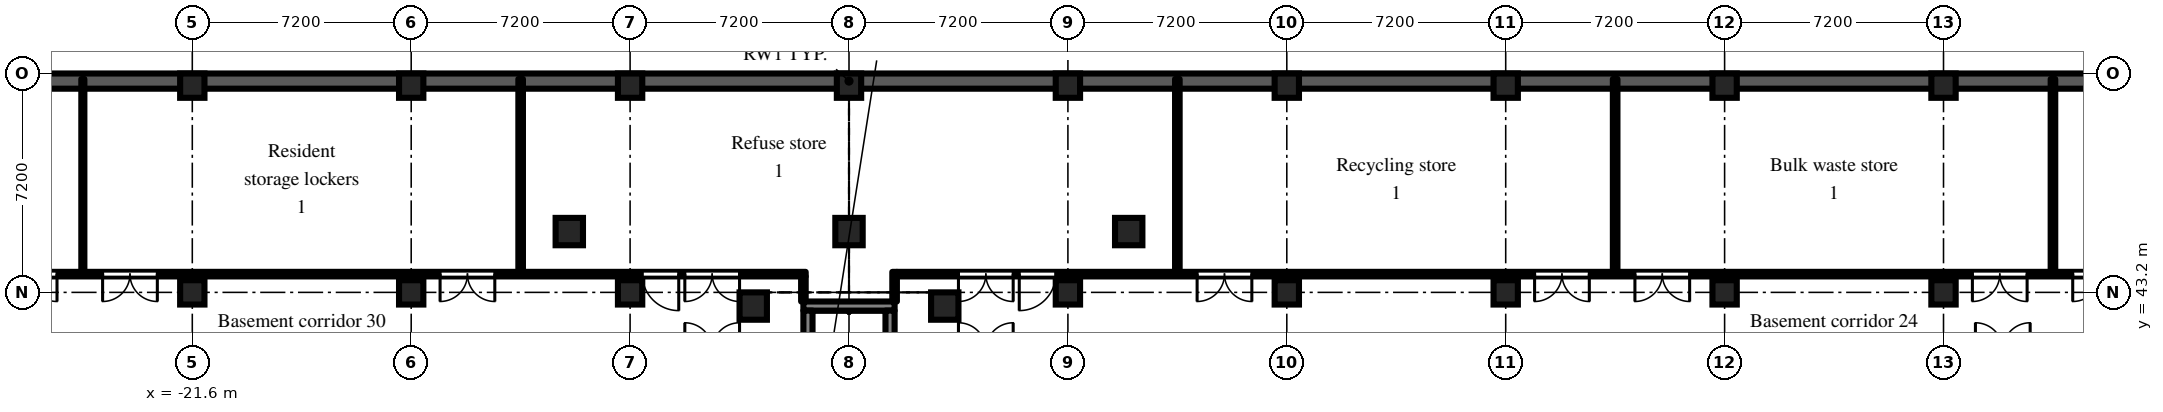
"""IFC4 building model, lengths in metres.
Left out: names, types, materials, properties, quantities, classifications, styles, units other than length and angle.
Written with IfcOpenShell. Run it as: python <this file> out.ifc"""

import sys

from ifc_helpers import new_model, si_unit, direction, frame, frame_2d, origin, origin_2d, place, context, subcontext, project, spatial, rectangle, extrude, element, fill, save


model = new_model("IFC4")
c1 = context("Model", 3, precision=1e-05, world=origin(), true_north=direction((0.0, 1.0)))
c2 = subcontext(c1, "Body", "Model", "MODEL_VIEW")
j1 = project(units=[si_unit("LENGTHUNIT", "METRE"), si_unit("PLANEANGLEUNIT", "RADIAN")], contexts=[c1])
p1 = place(None, origin())
s1 = spatial("IfcSite", under=j1, at=p1, CompositionType="ELEMENT")
p2 = place(p1, origin())
s2 = spatial("IfcBuilding", under=s1, at=p2, CompositionType="ELEMENT")
p3 = place(p2, frame((0.0, 0.0, -4.8)))
s3 = spatial("IfcBuildingStorey", under=s2, at=p3, CompositionType="ELEMENT", Elevation=-4.8)
p4 = place(p3, frame((-50.4, 50.15, -0.5), z_axis=(0.0, 0.0, 1.0), x_axis=(1.0, 0.0, 0.0)))
e1 = element("IfcWall", 1, at=p4, inside=s3, PredefinedType="SOLIDWALL", context=c2, shape_type="SweptSolid", body=[
    extrude(rectangle(XDim=100.8, YDim=0.5, at=frame_2d((50.4, 0.0))), origin(), (0.0, 0.0, 1.0), 5.3),
])
for number, where, z_axis, x_axis in (
    (2, (-3.15, 42.75, -0.5), (0.0, 0.0, 1.0), (1.0, 0.0, 0.0)),
    (3, (3.15, 42.75, -0.5), (0.0, 0.0, 1.0), (1.0, 0.0, 0.0)),
):
    element("IfcColumn", number, at=place(p3, frame(where, z_axis=z_axis, x_axis=x_axis)), inside=s3, PredefinedType="COLUMN", context=c2, shape_type="SweptSolid", body=[
        extrude(rectangle(XDim=0.9, YDim=0.9, at=origin_2d()), origin(), (0.0, 0.0, 1.0), 5.3),
    ])
for number, where, z_axis, x_axis in (
    (4, (-21.6, 43.2, -0.5), (0.0, 0.0, 1.0), (1.0, 0.0, 0.0)),
    (5, (-21.6, 50.0, -0.5), (0.0, 0.0, 1.0), (1.0, 0.0, 0.0)),
    (6, (-14.4, 43.2, -0.5), (0.0, 0.0, 1.0), (1.0, 0.0, 0.0)),
    (7, (-14.4, 50.0, -0.5), (0.0, 0.0, 1.0), (1.0, 0.0, 0.0)),
    (8, (-7.2, 43.2, -0.5), (0.0, 0.0, 1.0), (1.0, 0.0, 0.0)),
    (9, (-7.2, 50.0, -0.5), (0.0, 0.0, 1.0), (1.0, 0.0, 0.0)),
    (10, (0.0, 50.0, -0.5), (0.0, 0.0, 1.0), (1.0, 0.0, 0.0)),
    (11, (7.2, 43.2, -0.5), (0.0, 0.0, 1.0), (1.0, 0.0, 0.0)),
    (12, (7.2, 50.0, -0.5), (0.0, 0.0, 1.0), (1.0, 0.0, 0.0)),
    (13, (14.4, 43.2, -0.5), (0.0, 0.0, 1.0), (1.0, 0.0, 0.0)),
    (14, (14.4, 50.0, -0.5), (0.0, 0.0, 1.0), (1.0, 0.0, 0.0)),
    (15, (21.6, 43.2, -0.5), (0.0, 0.0, 1.0), (1.0, 0.0, 0.0)),
    (16, (21.6, 50.0, -0.5), (0.0, 0.0, 1.0), (1.0, 0.0, 0.0)),
    (17, (28.8, 43.2, -0.5), (0.0, 0.0, 1.0), (1.0, 0.0, 0.0)),
    (18, (28.8, 50.0, -0.5), (0.0, 0.0, 1.0), (1.0, 0.0, 0.0)),
    (19, (36.0, 43.2, -0.5), (0.0, 0.0, 1.0), (1.0, 0.0, 0.0)),
    (20, (36.0, 50.0, -0.5), (0.0, 0.0, 1.0), (1.0, 0.0, 0.0)),
):
    element("IfcColumn", number, at=place(p3, frame(where, z_axis=z_axis, x_axis=x_axis)), inside=s3, PredefinedType="COLUMN", context=c2, shape_type="SweptSolid", body=[
        extrude(rectangle(XDim=0.8, YDim=0.8, at=origin_2d()), origin(), (0.0, 0.0, 1.0), 5.3),
    ])
for number, where, z_axis, x_axis in (
    (21, (-9.2, 45.2, -0.5), (0.0, 0.0, 1.0), (1.0, 0.0, 0.0)),
    (22, (0.0, 45.2, -0.5), (0.0, 0.0, 1.0), (1.0, 0.0, 0.0)),
    (23, (9.2, 45.2, -0.5), (0.0, 0.0, 1.0), (1.0, 0.0, 0.0)),
):
    element("IfcColumn", number, at=place(p3, frame(where, z_axis=z_axis, x_axis=x_axis)), inside=s3, PredefinedType="COLUMN", context=c2, shape_type="SweptSolid", body=[
        extrude(rectangle(XDim=0.9, YDim=0.9, at=origin_2d()), origin(), (0.0, 0.0, 1.0), 5.3),
    ])
p5 = place(p3, frame((-1.5, 42.75, 0.0), z_axis=(0.0, 0.0, 1.0), x_axis=(1.0, 0.0, 0.0)))
e24 = element("IfcWall", 24, at=p5, inside=s3, PredefinedType="SHEAR", context=c2, shape_type="SweptSolid", body=[
    extrude(rectangle(XDim=3.0, YDim=0.3, at=frame_2d((1.5, 0.0))), origin(), (0.0, 0.0, 1.0), 4.35),
])
for number, where, z_axis, x_axis in (
    (25, (-1.35, 36.8, 0.0), (0.0, 0.0, 1.0), (0.0, 1.0, 0.0)),
    (26, (1.35, 36.8, 0.0), (0.0, 0.0, 1.0), (0.0, 1.0, 0.0)),
):
    element("IfcWall", number, at=place(p3, frame(where, z_axis=z_axis, x_axis=x_axis)), inside=s3, PredefinedType="SHEAR", context=c2, shape_type="SweptSolid", body=[
        extrude(rectangle(XDim=5.8, YDim=0.3, at=frame_2d((2.9, 0.0))), origin(), (0.0, 0.0, 1.0), 4.35),
    ])
p6 = place(p3, frame((-43.725, 43.8, 0.0), z_axis=(0.0, 0.0, 1.0), x_axis=(1.0, 0.0, 0.0)))
e27 = element("IfcWall", 27, at=p6, inside=s3, PredefinedType="PARTITIONING", context=c2, shape_type="SweptSolid", body=[
    extrude(rectangle(XDim=42.3, YDim=0.15, at=frame_2d((21.15, 0.0))), origin(), (0.0, 0.0, 1.0), 4.35),
])
p7 = place(p6, frame((4.775, 0.0, 0.0)))
e28 = element("IfcOpeningElement", 28, at=p7, cuts=e27, PredefinedType="OPENING", context=c2, shape_type="SweptSolid", body=[
    extrude(rectangle(XDim=1.8, YDim=2.1, at=frame_2d((0.9, 1.05))), frame((0.0, 0.085, 0.0), z_axis=(0.0, -1.0, 0.0), x_axis=(1.0, 0.0, 0.0)), (0.0, 0.0, 1.0), 0.17),
])
p8 = place(p6, frame((15.875, 0.0, 0.0)))
e29 = element("IfcOpeningElement", 29, at=p8, cuts=e27, PredefinedType="OPENING", context=c2, shape_type="SweptSolid", body=[
    extrude(rectangle(XDim=1.8, YDim=2.1, at=frame_2d((0.9, 1.05))), frame((0.0, 0.085, 0.0), z_axis=(0.0, -1.0, 0.0), x_axis=(1.0, 0.0, 0.0)), (0.0, 0.0, 1.0), 0.17),
])
p9 = place(p6, frame((19.175, 0.0, 0.0)))
e30 = element("IfcOpeningElement", 30, at=p9, cuts=e27, PredefinedType="OPENING", context=c2, shape_type="SweptSolid", body=[
    extrude(rectangle(XDim=1.8, YDim=2.1, at=frame_2d((0.9, 1.05))), frame((0.0, 0.085, 0.0), z_axis=(0.0, -1.0, 0.0), x_axis=(1.0, 0.0, 0.0)), (0.0, 0.0, 1.0), 0.17),
])
p10 = place(p6, frame((30.275, 0.0, 0.0)))
e31 = element("IfcOpeningElement", 31, at=p10, cuts=e27, PredefinedType="OPENING", context=c2, shape_type="SweptSolid", body=[
    extrude(rectangle(XDim=1.8, YDim=2.1, at=frame_2d((0.9, 1.05))), frame((0.0, 0.085, 0.0), z_axis=(0.0, -1.0, 0.0), x_axis=(1.0, 0.0, 0.0)), (0.0, 0.0, 1.0), 0.17),
])
p11 = place(p6, frame((36.925, 0.0, 0.0)))
e32 = element("IfcOpeningElement", 32, at=p11, cuts=e27, PredefinedType="OPENING", context=c2, shape_type="SweptSolid", body=[
    extrude(rectangle(XDim=1.2, YDim=2.1, at=frame_2d((0.6, 1.05))), frame((0.0, 0.085, 0.0), z_axis=(0.0, -1.0, 0.0), x_axis=(1.0, 0.0, 0.0)), (0.0, 0.0, 1.0), 0.17),
])
p12 = place(p6, frame((38.325, 0.0, 0.0)))
e33 = element("IfcOpeningElement", 33, at=p12, cuts=e27, PredefinedType="OPENING", context=c2, shape_type="SweptSolid", body=[
    extrude(rectangle(XDim=1.8, YDim=2.1, at=frame_2d((0.9, 1.05))), frame((0.0, 0.085, 0.0), z_axis=(0.0, -1.0, 0.0), x_axis=(1.0, 0.0, 0.0)), (0.0, 0.0, 1.0), 0.17),
])
p13 = place(p6, frame((1.675, 0.0, 0.0)))
e34 = element("IfcOpeningElement", 34, at=p13, cuts=e27, PredefinedType="OPENING", context=c2, shape_type="SweptSolid", body=[
    extrude(rectangle(XDim=1.8, YDim=2.1, at=frame_2d((0.9, 1.05))), frame((0.0, 0.085, 0.0), z_axis=(0.0, -1.0, 0.0), x_axis=(1.0, 0.0, 0.0)), (0.0, 0.0, 1.0), 0.17),
])
p14 = place(p3, frame((-25.2, 43.875, 0.0), z_axis=(0.0, 0.0, 1.0), x_axis=(0.0, 1.0, 0.0)))
e35 = element("IfcWall", 35, at=p14, inside=s3, PredefinedType="PARTITIONING", context=c2, shape_type="SweptSolid", body=[
    extrude(rectangle(XDim=6.345, YDim=0.1, at=frame_2d((3.172, 0.0))), origin(), (0.0, 0.0, 1.0), 4.35),
])
p15 = place(p3, frame((-10.8, 43.875, 0.0), z_axis=(0.0, 0.0, 1.0), x_axis=(0.0, 1.0, 0.0)))
e36 = element("IfcWall", 36, at=p15, inside=s3, PredefinedType="PARTITIONING", context=c2, shape_type="SweptSolid", body=[
    extrude(rectangle(XDim=6.345, YDim=0.15, at=frame_2d((3.172, 0.0))), origin(), (0.0, 0.0, 1.0), 4.35),
])
p16 = place(p3, frame((-1.5, 42.9, 0.0), z_axis=(0.0, 0.0, 1.0), x_axis=(0.0, 1.0, 0.0)))
e37 = element("IfcWall", 37, at=p16, inside=s3, PredefinedType="PARTITIONING", context=c2, shape_type="SweptSolid", body=[
    extrude(rectangle(XDim=0.825, YDim=0.15, at=frame_2d((0.413, 0.0))), origin(), (0.0, 0.0, 1.0), 4.35),
])
p17 = place(p3, frame((1.5, 42.9, 0.0), z_axis=(0.0, 0.0, 1.0), x_axis=(0.0, 1.0, 0.0)))
e38 = element("IfcWall", 38, at=p17, inside=s3, PredefinedType="PARTITIONING", context=c2, shape_type="SweptSolid", body=[
    extrude(rectangle(XDim=0.975, YDim=0.15, at=frame_2d((0.488, 0.0))), origin(), (0.0, 0.0, 1.0), 4.35),
])
p18 = place(p3, frame((1.575, 43.8, 0.0), z_axis=(0.0, 0.0, 1.0), x_axis=(1.0, 0.0, 0.0)))
e39 = element("IfcWall", 39, at=p18, inside=s3, PredefinedType="PARTITIONING", context=c2, shape_type="SweptSolid", body=[
    extrude(rectangle(XDim=42.3, YDim=0.15, at=frame_2d((21.15, 0.0))), origin(), (0.0, 0.0, 1.0), 4.35),
])
p19 = place(p18, frame((2.025, 0.0, 0.0)))
e40 = element("IfcOpeningElement", 40, at=p19, cuts=e39, PredefinedType="OPENING", context=c2, shape_type="SweptSolid", body=[
    extrude(rectangle(XDim=1.8, YDim=2.1, at=frame_2d((0.9, 1.05))), frame((0.0, 0.085, 0.0), z_axis=(0.0, -1.0, 0.0), x_axis=(1.0, 0.0, 0.0)), (0.0, 0.0, 1.0), 0.17),
])
p20 = place(p18, frame((4.025, 0.0, 0.0)))
e41 = element("IfcOpeningElement", 41, at=p20, cuts=e39, PredefinedType="OPENING", context=c2, shape_type="SweptSolid", body=[
    extrude(rectangle(XDim=1.2, YDim=2.1, at=frame_2d((0.6, 1.05))), frame((0.0, 0.085, 0.0), z_axis=(0.0, -1.0, 0.0), x_axis=(1.0, 0.0, 0.0)), (0.0, 0.0, 1.0), 0.17),
])
p21 = place(p18, frame((9.875, 0.0, 0.0)))
e42 = element("IfcOpeningElement", 42, at=p21, cuts=e39, PredefinedType="OPENING", context=c2, shape_type="SweptSolid", body=[
    extrude(rectangle(XDim=1.8, YDim=2.1, at=frame_2d((0.9, 1.05))), frame((0.0, 0.085, 0.0), z_axis=(0.0, -1.0, 0.0), x_axis=(1.0, 0.0, 0.0)), (0.0, 0.0, 1.0), 0.17),
])
p22 = place(p18, frame((20.975, 0.0, 0.0)))
e43 = element("IfcOpeningElement", 43, at=p22, cuts=e39, PredefinedType="OPENING", context=c2, shape_type="SweptSolid", body=[
    extrude(rectangle(XDim=1.8, YDim=2.1, at=frame_2d((0.9, 1.05))), frame((0.0, 0.085, 0.0), z_axis=(0.0, -1.0, 0.0), x_axis=(1.0, 0.0, 0.0)), (0.0, 0.0, 1.0), 0.17),
])
p23 = place(p18, frame((24.275, 0.0, 0.0)))
e44 = element("IfcOpeningElement", 44, at=p23, cuts=e39, PredefinedType="OPENING", context=c2, shape_type="SweptSolid", body=[
    extrude(rectangle(XDim=1.8, YDim=2.1, at=frame_2d((0.9, 1.05))), frame((0.0, 0.085, 0.0), z_axis=(0.0, -1.0, 0.0), x_axis=(1.0, 0.0, 0.0)), (0.0, 0.0, 1.0), 0.17),
])
p24 = place(p18, frame((35.375, 0.0, 0.0)))
e45 = element("IfcOpeningElement", 45, at=p24, cuts=e39, PredefinedType="OPENING", context=c2, shape_type="SweptSolid", body=[
    extrude(rectangle(XDim=1.8, YDim=2.1, at=frame_2d((0.9, 1.05))), frame((0.0, 0.085, 0.0), z_axis=(0.0, -1.0, 0.0), x_axis=(1.0, 0.0, 0.0)), (0.0, 0.0, 1.0), 0.17),
])
p25 = place(p18, frame((38.675, 0.0, 0.0)))
e46 = element("IfcOpeningElement", 46, at=p25, cuts=e39, PredefinedType="OPENING", context=c2, shape_type="SweptSolid", body=[
    extrude(rectangle(XDim=1.8, YDim=2.1, at=frame_2d((0.9, 1.05))), frame((0.0, 0.085, 0.0), z_axis=(0.0, -1.0, 0.0), x_axis=(1.0, 0.0, 0.0)), (0.0, 0.0, 1.0), 0.17),
])
for number, where, z_axis, x_axis in (
    (47, (10.8, 43.875, 0.0), (0.0, 0.0, 1.0), (0.0, 1.0, 0.0)),
    (48, (25.2, 43.875, 0.0), (0.0, 0.0, 1.0), (0.0, 1.0, 0.0)),
    (49, (39.6, 43.875, 0.0), (0.0, 0.0, 1.0), (0.0, 1.0, 0.0)),
):
    element("IfcWall", number, at=place(p3, frame(where, z_axis=z_axis, x_axis=x_axis)), inside=s3, PredefinedType="PARTITIONING", context=c2, shape_type="SweptSolid", body=[
        extrude(rectangle(XDim=6.345, YDim=0.15, at=frame_2d((3.172, 0.0))), origin(), (0.0, 0.0, 1.0), 4.35),
    ])
p26 = place(p8, frame((1.8, 0.0, 0.0), z_axis=(0.0, 0.0, 1.0), x_axis=(-1.0, 0.0, 0.0)))
e50 = element("IfcDoor", 50, at=p26, inside=s3, OperationType="DOUBLE_DOOR_DOUBLE_SWING", PredefinedType="DOOR", context=c2, shape_type="SweptSolid", body=[
    extrude(rectangle(XDim=1.8, YDim=2.1, at=frame_2d((0.9, 1.05))), frame((0.0, 0.025, 0.0), z_axis=(0.0, -1.0, 0.0), x_axis=(1.0, 0.0, 0.0)), (0.0, 0.0, 1.0), 0.05),
])
fill(e29, e50)
p27 = place(p9, frame((1.8, 0.0, 0.0), z_axis=(0.0, 0.0, 1.0), x_axis=(-1.0, 0.0, 0.0)))
e51 = element("IfcDoor", 51, at=p27, inside=s3, OperationType="DOUBLE_DOOR_DOUBLE_SWING", PredefinedType="DOOR", context=c2, shape_type="SweptSolid", body=[
    extrude(rectangle(XDim=1.8, YDim=2.1, at=frame_2d((0.9, 1.05))), frame((0.0, 0.025, 0.0), z_axis=(0.0, -1.0, 0.0), x_axis=(1.0, 0.0, 0.0)), (0.0, 0.0, 1.0), 0.05),
])
fill(e30, e51)
p28 = place(p10, frame((1.8, 0.0, 0.0), z_axis=(0.0, 0.0, 1.0), x_axis=(-1.0, 0.0, 0.0)))
e52 = element("IfcDoor", 52, at=p28, inside=s3, OperationType="DOUBLE_DOOR_DOUBLE_SWING", PredefinedType="DOOR", context=c2, shape_type="SweptSolid", body=[
    extrude(rectangle(XDim=1.8, YDim=2.1, at=frame_2d((0.9, 1.05))), frame((0.0, 0.025, 0.0), z_axis=(0.0, -1.0, 0.0), x_axis=(1.0, 0.0, 0.0)), (0.0, 0.0, 1.0), 0.05),
])
fill(e31, e52)
p29 = place(p11, frame((1.2, 0.0, 0.0), z_axis=(0.0, 0.0, 1.0), x_axis=(-1.0, 0.0, 0.0)))
e53 = element("IfcDoor", 53, at=p29, inside=s3, OperationType="SINGLE_SWING_LEFT", PredefinedType="DOOR", context=c2, shape_type="SweptSolid", body=[
    extrude(rectangle(XDim=1.2, YDim=2.1, at=frame_2d((0.6, 1.05))), frame((0.0, 0.025, 0.0), z_axis=(0.0, -1.0, 0.0), x_axis=(1.0, 0.0, 0.0)), (0.0, 0.0, 1.0), 0.05),
])
fill(e32, e53)
p30 = place(p12, frame((1.8, 0.0, 0.0), z_axis=(0.0, 0.0, 1.0), x_axis=(-1.0, 0.0, 0.0)))
e54 = element("IfcDoor", 54, at=p30, inside=s3, OperationType="DOUBLE_DOOR_DOUBLE_SWING", PredefinedType="DOOR", context=c2, shape_type="SweptSolid", body=[
    extrude(rectangle(XDim=1.8, YDim=2.1, at=frame_2d((0.9, 1.05))), frame((0.0, 0.025, 0.0), z_axis=(0.0, -1.0, 0.0), x_axis=(1.0, 0.0, 0.0)), (0.0, 0.0, 1.0), 0.05),
])
fill(e33, e54)
p31 = place(p19, frame((1.8, 0.0, 0.0), z_axis=(0.0, 0.0, 1.0), x_axis=(-1.0, 0.0, 0.0)))
e55 = element("IfcDoor", 55, at=p31, inside=s3, OperationType="DOUBLE_DOOR_DOUBLE_SWING", PredefinedType="DOOR", context=c2, shape_type="SweptSolid", body=[
    extrude(rectangle(XDim=1.8, YDim=2.1, at=frame_2d((0.9, 1.05))), frame((0.0, 0.025, 0.0), z_axis=(0.0, -1.0, 0.0), x_axis=(1.0, 0.0, 0.0)), (0.0, 0.0, 1.0), 0.05),
])
fill(e40, e55)
p32 = place(p20, frame((1.2, 0.0, 0.0), z_axis=(0.0, 0.0, 1.0), x_axis=(-1.0, 0.0, 0.0)))
e56 = element("IfcDoor", 56, at=p32, inside=s3, OperationType="SINGLE_SWING_RIGHT", PredefinedType="DOOR", context=c2, shape_type="SweptSolid", body=[
    extrude(rectangle(XDim=1.2, YDim=2.1, at=frame_2d((0.6, 1.05))), frame((0.0, 0.025, 0.0), z_axis=(0.0, -1.0, 0.0), x_axis=(1.0, 0.0, 0.0)), (0.0, 0.0, 1.0), 0.05),
])
fill(e41, e56)
p33 = place(p21, frame((1.8, 0.0, 0.0), z_axis=(0.0, 0.0, 1.0), x_axis=(-1.0, 0.0, 0.0)))
e57 = element("IfcDoor", 57, at=p33, inside=s3, OperationType="DOUBLE_DOOR_DOUBLE_SWING", PredefinedType="DOOR", context=c2, shape_type="SweptSolid", body=[
    extrude(rectangle(XDim=1.8, YDim=2.1, at=frame_2d((0.9, 1.05))), frame((0.0, 0.025, 0.0), z_axis=(0.0, -1.0, 0.0), x_axis=(1.0, 0.0, 0.0)), (0.0, 0.0, 1.0), 0.05),
])
fill(e42, e57)
p34 = place(p22, frame((1.8, 0.0, 0.0), z_axis=(0.0, 0.0, 1.0), x_axis=(-1.0, 0.0, 0.0)))
e58 = element("IfcDoor", 58, at=p34, inside=s3, OperationType="DOUBLE_DOOR_DOUBLE_SWING", PredefinedType="DOOR", context=c2, shape_type="SweptSolid", body=[
    extrude(rectangle(XDim=1.8, YDim=2.1, at=frame_2d((0.9, 1.05))), frame((0.0, 0.025, 0.0), z_axis=(0.0, -1.0, 0.0), x_axis=(1.0, 0.0, 0.0)), (0.0, 0.0, 1.0), 0.05),
])
fill(e43, e58)
p35 = place(p23, frame((1.8, 0.0, 0.0), z_axis=(0.0, 0.0, 1.0), x_axis=(-1.0, 0.0, 0.0)))
e59 = element("IfcDoor", 59, at=p35, inside=s3, OperationType="DOUBLE_DOOR_DOUBLE_SWING", PredefinedType="DOOR", context=c2, shape_type="SweptSolid", body=[
    extrude(rectangle(XDim=1.8, YDim=2.1, at=frame_2d((0.9, 1.05))), frame((0.0, 0.025, 0.0), z_axis=(0.0, -1.0, 0.0), x_axis=(1.0, 0.0, 0.0)), (0.0, 0.0, 1.0), 0.05),
])
fill(e44, e59)
p36 = place(p24, frame((1.8, 0.0, 0.0), z_axis=(0.0, 0.0, 1.0), x_axis=(-1.0, 0.0, 0.0)))
e60 = element("IfcDoor", 60, at=p36, inside=s3, OperationType="DOUBLE_DOOR_DOUBLE_SWING", PredefinedType="DOOR", context=c2, shape_type="SweptSolid", body=[
    extrude(rectangle(XDim=1.8, YDim=2.1, at=frame_2d((0.9, 1.05))), frame((0.0, 0.025, 0.0), z_axis=(0.0, -1.0, 0.0), x_axis=(1.0, 0.0, 0.0)), (0.0, 0.0, 1.0), 0.05),
])
fill(e45, e60)
p37 = place(p25, frame((1.8, 0.0, 0.0), z_axis=(0.0, 0.0, 1.0), x_axis=(-1.0, 0.0, 0.0)))
e61 = element("IfcDoor", 61, at=p37, inside=s3, OperationType="DOUBLE_DOOR_DOUBLE_SWING", PredefinedType="DOOR", context=c2, shape_type="SweptSolid", body=[
    extrude(rectangle(XDim=1.8, YDim=2.1, at=frame_2d((0.9, 1.05))), frame((0.0, 0.025, 0.0), z_axis=(0.0, -1.0, 0.0), x_axis=(1.0, 0.0, 0.0)), (0.0, 0.0, 1.0), 0.05),
])
fill(e46, e61)
save(model, sys.argv[1])
